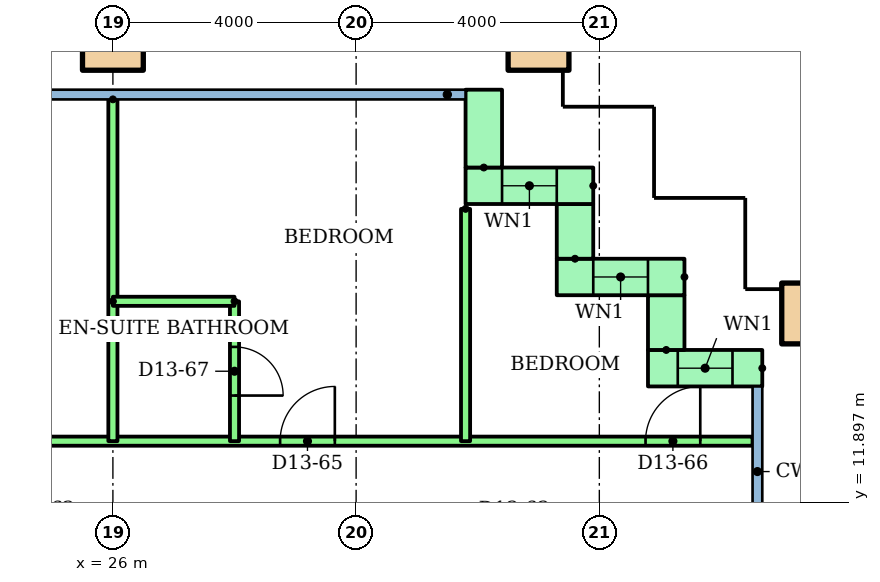
"""IFC4 building model, lengths in metres.
Left out: names, types, materials, properties, quantities, classifications, styles, units other than length and angle.
Written with IfcOpenShell. Run it as: python <this file> out.ifc"""

import sys

from ifc_helpers import new_model, si_unit, direction, frame, frame_2d, origin, origin_2d, place, context, subcontext, project, spatial, rectangle, hollow_rectangle, extrude, element, fill, save


model = new_model("IFC4")
c1 = context("Model", 3, precision=1e-05, world=origin(), true_north=direction((0.0, 1.0)))
c2 = subcontext(c1, "Body", "Model", "MODEL_VIEW")
j1 = project(units=[si_unit("LENGTHUNIT", "METRE"), si_unit("PLANEANGLEUNIT", "RADIAN")], contexts=[c1])
p1 = place(None, origin())
s1 = spatial("IfcSite", under=j1, at=p1, CompositionType="ELEMENT")
p2 = place(p1, origin())
s2 = spatial("IfcBuilding", under=s1, at=p2, CompositionType="ELEMENT")
p3 = place(p2, frame((0.0, 0.0, 51.2)))
s3 = spatial("IfcBuildingStorey", under=s2, at=p3, CompositionType="ELEMENT", Elevation=51.2)
for number, where in (
    (1, (37.5, 15.0, 0.0)),
    (2, (26.0, 19.5, 0.0)),
    (3, (33.0, 19.5, 0.0)),
):
    element("IfcColumn", number, at=place(p3, frame(where)), inside=s3, PredefinedType="COLUMN", context=c2, shape_type="SweptSolid", body=[
        extrude(hollow_rectangle(XDim=1.0, YDim=1.0, WallThickness=0.05, at=origin_2d()), origin(), (0.0, 0.0, 1.0), 3.2),
    ])
p4 = place(p3, frame((36.68, 14.1, 0.0), z_axis=(0.0, 0.0, 1.0), x_axis=(-1.0, 0.0, 0.0)))
e4 = element("IfcWall", 4, at=p4, inside=s3, PredefinedType="STANDARD", context=c2, shape_type="SweptSolid", body=[
    extrude(rectangle(XDim=1.88, YDim=0.6, at=frame_2d((0.94, 0.0))), origin(), (0.0, 0.0, 1.0), 2.92),
])
p5 = place(p4, frame((0.49, 0.0, 0.9)))
e5 = element("IfcOpeningElement", 5, at=p5, cuts=e4, PredefinedType="OPENING", context=c2, shape_type="SweptSolid", body=[
    extrude(rectangle(XDim=0.9, YDim=1.5, at=frame_2d((0.45, 0.75))), frame((0.0, 0.31, 0.0), z_axis=(0.0, -1.0, 0.0), x_axis=(1.0, 0.0, 0.0)), (0.0, 0.0, 1.0), 0.62),
])
p6 = place(p3, frame((35.1, 14.4, 0.0), z_axis=(0.0, 0.0, 1.0), x_axis=(0.0, 1.0, 0.0)))
e6 = element("IfcWall", 6, at=p6, inside=s3, PredefinedType="STANDARD", context=c2, shape_type="SweptSolid", body=[
    extrude(rectangle(XDim=0.9, YDim=0.6, at=frame_2d((0.45, 0.0))), origin(), (0.0, 0.0, 1.0), 2.92),
])
p7 = place(p3, frame((35.4, 15.6, 0.0), z_axis=(0.0, 0.0, 1.0), x_axis=(-1.0, 0.0, 0.0)))
e7 = element("IfcWall", 7, at=p7, inside=s3, PredefinedType="STANDARD", context=c2, shape_type="SweptSolid", body=[
    extrude(rectangle(XDim=2.1, YDim=0.6, at=frame_2d((1.05, 0.0))), origin(), (0.0, 0.0, 1.0), 2.92),
])
p8 = place(p7, frame((0.6, 0.0, 0.9)))
e8 = element("IfcOpeningElement", 8, at=p8, cuts=e7, PredefinedType="OPENING", context=c2, shape_type="SweptSolid", body=[
    extrude(rectangle(XDim=0.9, YDim=1.5, at=frame_2d((0.45, 0.75))), frame((0.0, 0.31, 0.0), z_axis=(0.0, -1.0, 0.0), x_axis=(1.0, 0.0, 0.0)), (0.0, 0.0, 1.0), 0.62),
])
p9 = place(p3, frame((33.6, 15.9, 0.0), z_axis=(0.0, 0.0, 1.0), x_axis=(0.0, 1.0, 0.0)))
e9 = element("IfcWall", 9, at=p9, inside=s3, PredefinedType="STANDARD", context=c2, shape_type="SweptSolid", body=[
    extrude(rectangle(XDim=0.9, YDim=0.6, at=frame_2d((0.45, 0.0))), origin(), (0.0, 0.0, 1.0), 2.92),
])
p10 = place(p3, frame((33.9, 17.1, 0.0), z_axis=(0.0, 0.0, 1.0), x_axis=(-1.0, 0.0, 0.0)))
e10 = element("IfcWall", 10, at=p10, inside=s3, PredefinedType="STANDARD", context=c2, shape_type="SweptSolid", body=[
    extrude(rectangle(XDim=2.1, YDim=0.6, at=frame_2d((1.05, 0.0))), origin(), (0.0, 0.0, 1.0), 2.92),
])
p11 = place(p10, frame((0.6, 0.0, 0.9)))
e11 = element("IfcOpeningElement", 11, at=p11, cuts=e10, PredefinedType="OPENING", context=c2, shape_type="SweptSolid", body=[
    extrude(rectangle(XDim=0.9, YDim=1.5, at=frame_2d((0.45, 0.75))), frame((0.0, 0.31, 0.0), z_axis=(0.0, -1.0, 0.0), x_axis=(1.0, 0.0, 0.0)), (0.0, 0.0, 1.0), 0.62),
])
p12 = place(p3, frame((32.1, 17.4, 0.0), z_axis=(0.0, 0.0, 1.0), x_axis=(0.0, 1.0, 0.0)))
e12 = element("IfcWall", 12, at=p12, inside=s3, PredefinedType="STANDARD", context=c2, shape_type="SweptSolid", body=[
    extrude(rectangle(XDim=1.28, YDim=0.6, at=frame_2d((0.64, 0.0))), origin(), (0.0, 0.0, 1.0), 2.92),
])
p13 = place(p3, frame((14.0, 12.9, 0.0)))
e13 = element("IfcWall", 13, at=p13, inside=s3, PredefinedType="PARTITIONING", context=c2, shape_type="SweptSolid", body=[
    extrude(rectangle(XDim=22.52, YDim=0.15, at=frame_2d((11.26, 0.0))), origin(), (0.0, 0.0, 1.0), 2.4),
])
p14 = place(p13, frame((5.5, 0.0, 0.0)))
e14 = element("IfcOpeningElement", 14, at=p14, cuts=e13, PredefinedType="OPENING", context=c2, shape_type="SweptSolid", body=[
    extrude(rectangle(XDim=1.0, YDim=2.1, at=frame_2d((0.5, 1.05))), frame((0.0, 0.085, 0.0), z_axis=(0.0, -1.0, 0.0), x_axis=(1.0, 0.0, 0.0)), (0.0, 0.0, 1.0), 0.17),
])
p15 = place(p13, frame((14.75, 0.0, 0.0)))
e15 = element("IfcOpeningElement", 15, at=p15, cuts=e13, PredefinedType="OPENING", context=c2, shape_type="SweptSolid", body=[
    extrude(rectangle(XDim=0.9, YDim=2.1, at=frame_2d((0.45, 1.05))), frame((0.0, 0.085, 0.0), z_axis=(0.0, -1.0, 0.0), x_axis=(1.0, 0.0, 0.0)), (0.0, 0.0, 1.0), 0.17),
])
p16 = place(p13, frame((20.76, 0.0, 0.0)))
e16 = element("IfcOpeningElement", 16, at=p16, cuts=e13, PredefinedType="OPENING", context=c2, shape_type="SweptSolid", body=[
    extrude(rectangle(XDim=0.9, YDim=2.1, at=frame_2d((0.45, 1.05))), frame((0.0, 0.085, 0.0), z_axis=(0.0, -1.0, 0.0), x_axis=(1.0, 0.0, 0.0)), (0.0, 0.0, 1.0), 0.17),
])
p17 = place(p3, frame((26.0, 18.521, 0.0), z_axis=(0.0, 0.0, 1.0), x_axis=(0.0, -1.0, 0.0)))
e17 = element("IfcWall", 17, at=p17, inside=s3, PredefinedType="PARTITIONING", context=c2, shape_type="SweptSolid", body=[
    extrude(rectangle(XDim=5.621, YDim=0.15, at=frame_2d((2.811, 0.0))), origin(), (0.0, 0.0, 1.0), 2.4),
])
p18 = place(p3, frame((31.8, 16.72, 0.0), z_axis=(0.0, 0.0, 1.0), x_axis=(0.0, -1.0, 0.0)))
e18 = element("IfcWall", 18, at=p18, inside=s3, PredefinedType="PARTITIONING", context=c2, shape_type="SweptSolid", body=[
    extrude(rectangle(XDim=3.82, YDim=0.15, at=frame_2d((1.91, 0.0))), origin(), (0.0, 0.0, 1.0), 2.4),
])
p19 = place(p3, frame((28.0, 15.2, 0.0), z_axis=(0.0, 0.0, 1.0), x_axis=(0.0, -1.0, 0.0)))
e19 = element("IfcWall", 19, at=p19, inside=s3, PredefinedType="PARTITIONING", context=c2, shape_type="SweptSolid", body=[
    extrude(rectangle(XDim=2.3, YDim=0.15, at=frame_2d((1.15, 0.0))), origin(), (0.0, 0.0, 1.0), 2.4),
])
p20 = place(p19, frame((0.75, 0.0, 0.0)))
e20 = element("IfcOpeningElement", 20, at=p20, cuts=e19, PredefinedType="OPENING", context=c2, shape_type="SweptSolid", body=[
    extrude(rectangle(XDim=0.8, YDim=2.1, at=frame_2d((0.4, 1.05))), frame((0.0, 0.085, 0.0), z_axis=(0.0, -1.0, 0.0), x_axis=(1.0, 0.0, 0.0)), (0.0, 0.0, 1.0), 0.17),
])
p21 = place(p3, frame((26.0, 15.2, 0.0)))
e21 = element("IfcWall", 21, at=p21, inside=s3, PredefinedType="PARTITIONING", context=c2, shape_type="SweptSolid", body=[
    extrude(rectangle(XDim=2.0, YDim=0.15, at=frame_2d((1.0, 0.0))), origin(), (0.0, 0.0, 1.0), 2.4),
])
p22 = place(p5, origin())
e22 = element("IfcWindow", 22, at=p22, inside=s3, PartitioningType="SINGLE_PANEL", PredefinedType="WINDOW", context=c2, shape_type="SweptSolid", body=[
    extrude(rectangle(XDim=0.9, YDim=1.5, at=frame_2d((0.45, 0.75))), frame((0.0, 0.03, 0.0), z_axis=(0.0, -1.0, 0.0), x_axis=(1.0, 0.0, 0.0)), (0.0, 0.0, 1.0), 0.06),
])
fill(e5, e22)
p23 = place(p8, origin())
e23 = element("IfcWindow", 23, at=p23, inside=s3, PartitioningType="SINGLE_PANEL", PredefinedType="WINDOW", context=c2, shape_type="SweptSolid", body=[
    extrude(rectangle(XDim=0.9, YDim=1.5, at=frame_2d((0.45, 0.75))), frame((0.0, 0.03, 0.0), z_axis=(0.0, -1.0, 0.0), x_axis=(1.0, 0.0, 0.0)), (0.0, 0.0, 1.0), 0.06),
])
fill(e8, e23)
p24 = place(p11, origin())
e24 = element("IfcWindow", 24, at=p24, inside=s3, PartitioningType="SINGLE_PANEL", PredefinedType="WINDOW", context=c2, shape_type="SweptSolid", body=[
    extrude(rectangle(XDim=0.9, YDim=1.5, at=frame_2d((0.45, 0.75))), frame((0.0, 0.03, 0.0), z_axis=(0.0, -1.0, 0.0), x_axis=(1.0, 0.0, 0.0)), (0.0, 0.0, 1.0), 0.06),
])
fill(e11, e24)
p25 = place(p15, origin())
e25 = element("IfcDoor", 25, at=p25, inside=s3, OperationType="SINGLE_SWING_RIGHT", PredefinedType="DOOR", context=c2, shape_type="SweptSolid", body=[
    extrude(rectangle(XDim=0.9, YDim=2.1, at=frame_2d((0.45, 1.05))), frame((0.0, 0.025, 0.0), z_axis=(0.0, -1.0, 0.0), x_axis=(1.0, 0.0, 0.0)), (0.0, 0.0, 1.0), 0.05),
])
fill(e15, e25)
p26 = place(p16, origin())
e26 = element("IfcDoor", 26, at=p26, inside=s3, OperationType="SINGLE_SWING_RIGHT", PredefinedType="DOOR", context=c2, shape_type="SweptSolid", body=[
    extrude(rectangle(XDim=0.9, YDim=2.1, at=frame_2d((0.45, 1.05))), frame((0.0, 0.025, 0.0), z_axis=(0.0, -1.0, 0.0), x_axis=(1.0, 0.0, 0.0)), (0.0, 0.0, 1.0), 0.05),
])
fill(e16, e26)
p27 = place(p20, origin())
e27 = element("IfcDoor", 27, at=p27, inside=s3, OperationType="SINGLE_SWING_RIGHT", PredefinedType="DOOR", context=c2, shape_type="SweptSolid", body=[
    extrude(rectangle(XDim=0.8, YDim=2.1, at=frame_2d((0.4, 1.05))), frame((0.0, 0.025, 0.0), z_axis=(0.0, -1.0, 0.0), x_axis=(1.0, 0.0, 0.0)), (0.0, 0.0, 1.0), 0.05),
])
fill(e20, e27)
save(model, sys.argv[1])
